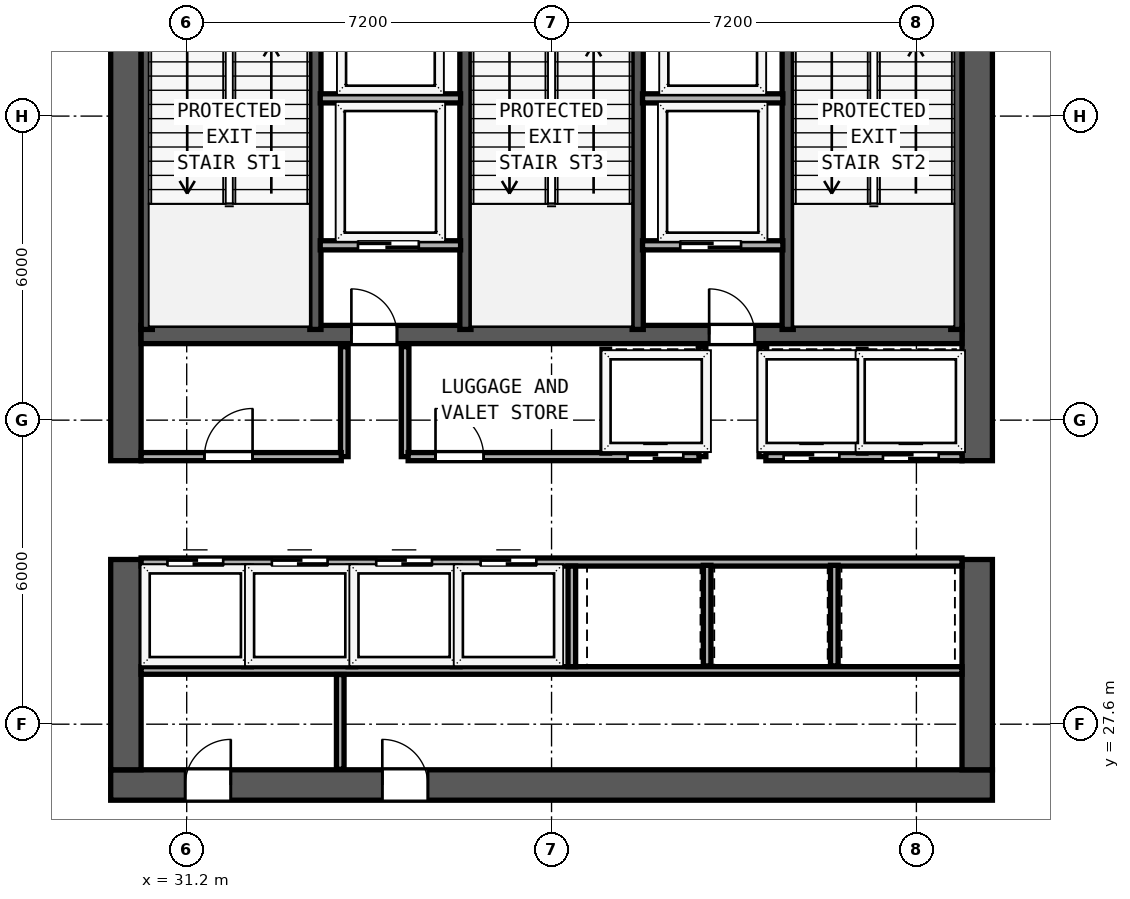
"""IFC4 building model, lengths in metres.
Left out: names, types, materials, properties, quantities, classifications, styles, units other than length and angle.
Written with IfcOpenShell. Run it as: python <this file> out.ifc"""

import sys

from ifc_helpers import new_model, si_unit, direction, frame, frame_2d, origin, place, context, subcontext, project, spatial, rectangle, extrude, element, fill, save


model = new_model("IFC4")
c1 = context("Model", 3, precision=1e-05, world=origin(), true_north=direction((0.0, 1.0)))
c2 = subcontext(c1, "Body", "Model", "MODEL_VIEW")
j1 = project(units=[si_unit("LENGTHUNIT", "METRE"), si_unit("PLANEANGLEUNIT", "RADIAN")], contexts=[c1])
p1 = place(None, origin())
s1 = spatial("IfcSite", under=j1, at=p1, CompositionType="ELEMENT")
p2 = place(p1, origin())
s2 = spatial("IfcBuilding", under=s1, at=p2, CompositionType="ELEMENT")
p3 = place(p2, frame((0.0, 0.0, 164.6)))
s3 = spatial("IfcBuildingStorey", under=s2, at=p3, CompositionType="ELEMENT", Elevation=164.6)
p4 = place(p3, frame((29.7, 26.4, 0.0), z_axis=(0.0, 0.0, 1.0), x_axis=(1.0, 0.0, 0.0)))
e1 = element("IfcWall", 1, at=p4, inside=s3, PredefinedType="SHEAR", context=c2, shape_type="SweptSolid", body=[
    extrude(rectangle(XDim=17.4, YDim=0.6, at=frame_2d((8.7, 0.0))), origin(), (0.0, 0.0, 1.0), 4.22),
])
p5 = place(p4, frame((2.37, 0.0, 0.0), z_axis=(0.0, 0.0, 1.0), x_axis=(-1.0, 0.0, 0.0)))
e2 = element("IfcOpeningElement", 2, at=p5, cuts=e1, PredefinedType="OPENING", context=c2, shape_type="SweptSolid", body=[
    extrude(rectangle(XDim=0.9, YDim=2.1, at=frame_2d((0.45, 1.05))), frame((0.0, 0.31, 0.0), z_axis=(0.0, -1.0, 0.0), x_axis=(1.0, 0.0, 0.0)), (0.0, 0.0, 1.0), 0.62),
])
p6 = place(p4, frame((6.26, 0.0, 0.0), z_axis=(0.0, 0.0, 1.0), x_axis=(-1.0, 0.0, 0.0)))
e3 = element("IfcOpeningElement", 3, at=p6, cuts=e1, PredefinedType="OPENING", context=c2, shape_type="SweptSolid", body=[
    extrude(rectangle(XDim=0.9, YDim=2.1, at=frame_2d((0.45, 1.05))), frame((0.0, 0.31, 0.0), z_axis=(0.0, -1.0, 0.0), x_axis=(1.0, 0.0, 0.0)), (0.0, 0.0, 1.0), 0.62),
])
p7 = place(p3, frame((30.0, 26.7, 0.0), z_axis=(0.0, 0.0, 1.0), x_axis=(0.0, 1.0, 0.0)))
e4 = element("IfcWall", 4, at=p7, inside=s3, PredefinedType="SHEAR", context=c2, shape_type="SweptSolid", body=[
    extrude(rectangle(XDim=4.15, YDim=0.6, at=frame_2d((2.075, 0.0))), origin(), (0.0, 0.0, 1.0), 4.22),
])
p8 = place(p3, frame((30.0, 32.8, 0.0), z_axis=(0.0, 0.0, 1.0), x_axis=(0.0, 1.0, 0.0)))
e5 = element("IfcWall", 5, at=p8, inside=s3, PredefinedType="SHEAR", context=c2, shape_type="SweptSolid", body=[
    extrude(rectangle(XDim=10.1, YDim=0.6, at=frame_2d((5.05, 0.0))), origin(), (0.0, 0.0, 1.0), 4.22),
])
p9 = place(p3, frame((46.8, 26.7, 0.0), z_axis=(0.0, 0.0, 1.0), x_axis=(0.0, 1.0, 0.0)))
e6 = element("IfcWall", 6, at=p9, inside=s3, PredefinedType="SHEAR", context=c2, shape_type="SweptSolid", body=[
    extrude(rectangle(XDim=4.15, YDim=0.6, at=frame_2d((2.075, 0.0))), origin(), (0.0, 0.0, 1.0), 4.22),
])
p10 = place(p3, frame((46.8, 32.8, 0.0), z_axis=(0.0, 0.0, 1.0), x_axis=(0.0, 1.0, 0.0)))
e7 = element("IfcWall", 7, at=p10, inside=s3, PredefinedType="SHEAR", context=c2, shape_type="SweptSolid", body=[
    extrude(rectangle(XDim=10.1, YDim=0.6, at=frame_2d((5.05, 0.0))), origin(), (0.0, 0.0, 1.0), 4.22),
])
p11 = place(p3, frame((30.3, 35.29, 0.0), z_axis=(0.0, 0.0, 1.0), x_axis=(1.0, 0.0, 0.0)))
e8 = element("IfcWall", 8, at=p11, inside=s3, PredefinedType="SHEAR", context=c2, shape_type="SweptSolid", body=[
    extrude(rectangle(XDim=16.2, YDim=0.36, at=frame_2d((8.1, 0.0))), origin(), (0.0, 0.0, 1.0), 4.22),
])
p12 = place(p11, frame((5.05, 0.0, 0.0), z_axis=(0.0, 0.0, 1.0), x_axis=(-1.0, 0.0, 0.0)))
e9 = element("IfcOpeningElement", 9, at=p12, cuts=e8, PredefinedType="OPENING", context=c2, shape_type="SweptSolid", body=[
    extrude(rectangle(XDim=0.9, YDim=2.1, at=frame_2d((0.45, 1.05))), frame((0.0, 0.19, 0.0), z_axis=(0.0, -1.0, 0.0), x_axis=(1.0, 0.0, 0.0)), (0.0, 0.0, 1.0), 0.38),
])
p13 = place(p11, frame((12.11, 0.0, 0.0), z_axis=(0.0, 0.0, 1.0), x_axis=(-1.0, 0.0, 0.0)))
e10 = element("IfcOpeningElement", 10, at=p13, cuts=e8, PredefinedType="OPENING", context=c2, shape_type="SweptSolid", body=[
    extrude(rectangle(XDim=0.9, YDim=2.1, at=frame_2d((0.45, 1.05))), frame((0.0, 0.19, 0.0), z_axis=(0.0, -1.0, 0.0), x_axis=(1.0, 0.0, 0.0)), (0.0, 0.0, 1.0), 0.38),
])
for number, where, z_axis, x_axis in (
    (11, (30.412, 35.39, 0.0), (0.0, 0.0, 1.0), (0.0, 1.0, 0.0)),
    (12, (33.74, 35.39, 0.0), (0.0, 0.0, 1.0), (0.0, 1.0, 0.0)),
    (13, (36.7, 35.39, 0.0), (0.0, 0.0, 1.0), (0.0, 1.0, 0.0)),
    (14, (40.1, 35.39, 0.0), (0.0, 0.0, 1.0), (0.0, 1.0, 0.0)),
    (15, (43.06, 35.39, 0.0), (0.0, 0.0, 1.0), (0.0, 1.0, 0.0)),
    (16, (46.388, 35.39, 0.0), (0.0, 0.0, 1.0), (0.0, 1.0, 0.0)),
):
    element("IfcWall", number, at=place(p3, frame(where, z_axis=z_axis, x_axis=x_axis)), inside=s3, PredefinedType="SHEAR", context=c2, shape_type="SweptSolid", body=[
        extrude(rectangle(XDim=7.51, YDim=0.22, at=frame_2d((3.755, 0.0))), origin(), (0.0, 0.0, 1.0), 4.22),
    ])
for number, where, z_axis, x_axis in (
    (17, (33.835, 39.95, 0.0), (0.0, 0.0, 1.0), (1.0, 0.0, 0.0)),
    (18, (40.195, 39.95, 0.0), (0.0, 0.0, 1.0), (1.0, 0.0, 0.0)),
):
    element("IfcWall", number, at=place(p3, frame(where, z_axis=z_axis, x_axis=x_axis)), inside=s3, PredefinedType="SOLIDWALL", context=c2, shape_type="SweptSolid", body=[
        extrude(rectangle(XDim=2.77, YDim=0.18, at=frame_2d((1.385, 0.0))), origin(), (0.0, 0.0, 1.0), 4.22),
    ])
p14 = place(p3, frame((33.835, 37.05, 0.0), z_axis=(0.0, 0.0, 1.0), x_axis=(1.0, 0.0, 0.0)))
e19 = element("IfcWall", 19, at=p14, inside=s3, PredefinedType="SOLIDWALL", context=c2, shape_type="SweptSolid", body=[
    extrude(rectangle(XDim=2.77, YDim=0.18, at=frame_2d((1.385, 0.0))), origin(), (0.0, 0.0, 1.0), 4.22),
])
p15 = place(p14, frame((1.945, 0.0, 0.0), z_axis=(0.0, 0.0, 1.0), x_axis=(-1.0, 0.0, 0.0)))
e20 = element("IfcOpeningElement", 20, at=p15, cuts=e19, PredefinedType="OPENING", context=c2, shape_type="SweptSolid", body=[
    extrude(rectangle(XDim=1.2, YDim=2.2, at=frame_2d((0.6, 1.1))), frame((0.0, 0.1, 0.0), z_axis=(0.0, -1.0, 0.0), x_axis=(1.0, 0.0, 0.0)), (0.0, 0.0, 1.0), 0.2),
])
for number, where, z_axis, x_axis in (
    (21, (34.31, 32.88, 0.0), (0.0, 0.0, 1.0), (0.0, 1.0, 0.0)),
    (22, (35.51, 32.88, 0.0), (0.0, 0.0, 1.0), (0.0, 1.0, 0.0)),
):
    element("IfcWall", number, at=place(p3, frame(where, z_axis=z_axis, x_axis=x_axis)), inside=s3, PredefinedType="SOLIDWALL", context=c2, shape_type="SweptSolid", body=[
        extrude(rectangle(XDim=2.17, YDim=0.15, at=frame_2d((1.085, 0.0))), origin(), (0.0, 0.0, 1.0), 4.22),
    ])
p16 = place(p3, frame((40.195, 37.05, 0.0), z_axis=(0.0, 0.0, 1.0), x_axis=(1.0, 0.0, 0.0)))
e23 = element("IfcWall", 23, at=p16, inside=s3, PredefinedType="SOLIDWALL", context=c2, shape_type="SweptSolid", body=[
    extrude(rectangle(XDim=2.77, YDim=0.18, at=frame_2d((1.385, 0.0))), origin(), (0.0, 0.0, 1.0), 4.22),
])
p17 = place(p16, frame((1.945, 0.0, 0.0), z_axis=(0.0, 0.0, 1.0), x_axis=(-1.0, 0.0, 0.0)))
e24 = element("IfcOpeningElement", 24, at=p17, cuts=e23, PredefinedType="OPENING", context=c2, shape_type="SweptSolid", body=[
    extrude(rectangle(XDim=1.2, YDim=2.2, at=frame_2d((0.6, 1.1))), frame((0.0, 0.1, 0.0), z_axis=(0.0, -1.0, 0.0), x_axis=(1.0, 0.0, 0.0)), (0.0, 0.0, 1.0), 0.2),
])
for number, where, z_axis, x_axis in (
    (25, (41.37, 32.88, 0.0), (0.0, 0.0, 1.0), (0.0, 1.0, 0.0)),
    (26, (42.57, 32.88, 0.0), (0.0, 0.0, 1.0), (0.0, 1.0, 0.0)),
):
    element("IfcWall", number, at=place(p3, frame(where, z_axis=z_axis, x_axis=x_axis)), inside=s3, PredefinedType="SOLIDWALL", context=c2, shape_type="SweptSolid", body=[
        extrude(rectangle(XDim=2.17, YDim=0.15, at=frame_2d((1.085, 0.0))), origin(), (0.0, 0.0, 1.0), 4.22),
    ])
p18 = place(p3, frame((30.3, 32.88, 0.0), z_axis=(0.0, 0.0, 1.0), x_axis=(1.0, 0.0, 0.0)))
e27 = element("IfcWall", 27, at=p18, inside=s3, PredefinedType="SOLIDWALL", context=c2, shape_type="SweptSolid", body=[
    extrude(rectangle(XDim=3.95, YDim=0.16, at=frame_2d((1.975, 0.0))), origin(), (0.0, 0.0, 1.0), 4.22),
])
p19 = place(p18, frame((2.2, 0.0, 0.0), z_axis=(0.0, 0.0, 1.0), x_axis=(-1.0, 0.0, 0.0)))
e28 = element("IfcOpeningElement", 28, at=p19, cuts=e27, PredefinedType="OPENING", context=c2, shape_type="SweptSolid", body=[
    extrude(rectangle(XDim=0.95, YDim=2.12, at=frame_2d((0.475, 1.06))), frame((0.0, 0.09, 0.0), z_axis=(0.0, -1.0, 0.0), x_axis=(1.0, 0.0, 0.0)), (0.0, 0.0, 1.0), 0.18),
])
p20 = place(p3, frame((35.57, 32.88, 0.0), z_axis=(0.0, 0.0, 1.0), x_axis=(1.0, 0.0, 0.0)))
e29 = element("IfcWall", 29, at=p20, inside=s3, PredefinedType="SOLIDWALL", context=c2, shape_type="SweptSolid", body=[
    extrude(rectangle(XDim=5.74, YDim=0.16, at=frame_2d((2.87, 0.0))), origin(), (0.0, 0.0, 1.0), 4.22),
])
p21 = place(p20, frame((1.49, 0.0, 0.0), z_axis=(0.0, 0.0, 1.0), x_axis=(-1.0, 0.0, 0.0)))
e30 = element("IfcOpeningElement", 30, at=p21, cuts=e29, PredefinedType="OPENING", context=c2, shape_type="SweptSolid", body=[
    extrude(rectangle(XDim=0.95, YDim=2.12, at=frame_2d((0.475, 1.06))), frame((0.0, 0.09, 0.0), z_axis=(0.0, -1.0, 0.0), x_axis=(1.0, 0.0, 0.0)), (0.0, 0.0, 1.0), 0.18),
])
p22 = place(p20, frame((5.43, 0.0, 0.0), z_axis=(0.0, 0.0, 1.0), x_axis=(-1.0, 0.0, 0.0)))
e31 = element("IfcOpeningElement", 31, at=p22, cuts=e29, PredefinedType="OPENING", context=c2, shape_type="SweptSolid", body=[
    extrude(rectangle(XDim=1.1, YDim=2.2, at=frame_2d((0.55, 1.1))), frame((0.0, 0.09, 0.0), z_axis=(0.0, -1.0, 0.0), x_axis=(1.0, 0.0, 0.0)), (0.0, 0.0, 1.0), 0.18),
])
p23 = place(p3, frame((42.63, 32.88, 0.0), z_axis=(0.0, 0.0, 1.0), x_axis=(1.0, 0.0, 0.0)))
e32 = element("IfcWall", 32, at=p23, inside=s3, PredefinedType="SOLIDWALL", context=c2, shape_type="SweptSolid", body=[
    extrude(rectangle(XDim=3.87, YDim=0.16, at=frame_2d((1.935, 0.0))), origin(), (0.0, 0.0, 1.0), 4.22),
])
p24 = place(p23, frame((1.45, 0.0, 0.0), z_axis=(0.0, 0.0, 1.0), x_axis=(-1.0, 0.0, 0.0)))
e33 = element("IfcOpeningElement", 33, at=p24, cuts=e32, PredefinedType="OPENING", context=c2, shape_type="SweptSolid", body=[
    extrude(rectangle(XDim=1.1, YDim=2.2, at=frame_2d((0.55, 1.1))), frame((0.0, 0.09, 0.0), z_axis=(0.0, -1.0, 0.0), x_axis=(1.0, 0.0, 0.0)), (0.0, 0.0, 1.0), 0.18),
])
p25 = place(p23, frame((3.41, 0.0, 0.0), z_axis=(0.0, 0.0, 1.0), x_axis=(-1.0, 0.0, 0.0)))
e34 = element("IfcOpeningElement", 34, at=p25, cuts=e32, PredefinedType="OPENING", context=c2, shape_type="SweptSolid", body=[
    extrude(rectangle(XDim=1.1, YDim=2.2, at=frame_2d((0.55, 1.1))), frame((0.0, 0.09, 0.0), z_axis=(0.0, -1.0, 0.0), x_axis=(1.0, 0.0, 0.0)), (0.0, 0.0, 1.0), 0.18),
])
for number, where, z_axis, x_axis in (
    (35, (39.47, 32.95, 0.0), (0.0, 0.0, 1.0), (0.0, 1.0, 0.0)),
    (36, (44.53, 32.95, 0.0), (0.0, 0.0, 1.0), (0.0, 1.0, 0.0)),
):
    element("IfcWall", number, at=place(p3, frame(where, z_axis=z_axis, x_axis=x_axis)), inside=s3, PredefinedType="SOLIDWALL", context=c2, shape_type="SweptSolid", body=[
        extrude(rectangle(XDim=2.05, YDim=0.15, at=frame_2d((1.025, 0.0))), origin(), (0.0, 0.0, 1.0), 4.22),
    ])
p26 = place(p3, frame((30.3, 30.8, 0.0), z_axis=(0.0, 0.0, 1.0), x_axis=(1.0, 0.0, 0.0)))
e37 = element("IfcWall", 37, at=p26, inside=s3, PredefinedType="SOLIDWALL", context=c2, shape_type="SweptSolid", body=[
    extrude(rectangle(XDim=16.2, YDim=0.16, at=frame_2d((8.1, 0.0))), origin(), (0.0, 0.0, 1.0), 4.22),
])
p27 = place(p26, frame((0.52, 0.0, 0.0)))
e38 = element("IfcOpeningElement", 38, at=p27, cuts=e37, PredefinedType="OPENING", context=c2, shape_type="SweptSolid", body=[
    extrude(rectangle(XDim=1.1, YDim=2.2, at=frame_2d((0.55, 1.1))), frame((0.0, 0.09, 0.0), z_axis=(0.0, -1.0, 0.0), x_axis=(1.0, 0.0, 0.0)), (0.0, 0.0, 1.0), 0.18),
])
p28 = place(p26, frame((2.58, 0.0, 0.0)))
e39 = element("IfcOpeningElement", 39, at=p28, cuts=e37, PredefinedType="OPENING", context=c2, shape_type="SweptSolid", body=[
    extrude(rectangle(XDim=1.1, YDim=2.2, at=frame_2d((0.55, 1.1))), frame((0.0, 0.09, 0.0), z_axis=(0.0, -1.0, 0.0), x_axis=(1.0, 0.0, 0.0)), (0.0, 0.0, 1.0), 0.18),
])
p29 = place(p26, frame((4.64, 0.0, 0.0)))
e40 = element("IfcOpeningElement", 40, at=p29, cuts=e37, PredefinedType="OPENING", context=c2, shape_type="SweptSolid", body=[
    extrude(rectangle(XDim=1.1, YDim=2.2, at=frame_2d((0.55, 1.1))), frame((0.0, 0.09, 0.0), z_axis=(0.0, -1.0, 0.0), x_axis=(1.0, 0.0, 0.0)), (0.0, 0.0, 1.0), 0.18),
])
p30 = place(p26, frame((6.7, 0.0, 0.0)))
e41 = element("IfcOpeningElement", 41, at=p30, cuts=e37, PredefinedType="OPENING", context=c2, shape_type="SweptSolid", body=[
    extrude(rectangle(XDim=1.1, YDim=2.2, at=frame_2d((0.55, 1.1))), frame((0.0, 0.09, 0.0), z_axis=(0.0, -1.0, 0.0), x_axis=(1.0, 0.0, 0.0)), (0.0, 0.0, 1.0), 0.18),
])
p31 = place(p3, frame((30.3, 28.66, 0.0), z_axis=(0.0, 0.0, 1.0), x_axis=(1.0, 0.0, 0.0)))
e42 = element("IfcWall", 42, at=p31, inside=s3, PredefinedType="PARTITIONING", context=c2, shape_type="SweptSolid", body=[
    extrude(rectangle(XDim=16.2, YDim=0.15, at=frame_2d((8.1, 0.0))), origin(), (0.0, 0.0, 1.0), 4.22),
])
for number, where, z_axis, x_axis in (
    (43, (32.4, 28.735, 0.0), (0.0, 0.0, 1.0), (0.0, 1.0, 0.0)),
    (44, (34.46, 28.735, 0.0), (0.0, 0.0, 1.0), (0.0, 1.0, 0.0)),
    (45, (36.52, 28.735, 0.0), (0.0, 0.0, 1.0), (0.0, 1.0, 0.0)),
    (46, (38.8, 28.735, 0.0), (0.0, 0.0, 1.0), (0.0, 1.0, 0.0)),
):
    element("IfcWall", number, at=place(p3, frame(where, z_axis=z_axis, x_axis=x_axis)), inside=s3, PredefinedType="SOLIDWALL", context=c2, shape_type="SweptSolid", body=[
        extrude(rectangle(XDim=1.985, YDim=0.15, at=frame_2d((0.992, 0.0))), origin(), (0.0, 0.0, 1.0), 4.22),
    ])
p32 = place(p3, frame((34.23, 26.71, 0.0), z_axis=(0.0, 0.0, 1.0), x_axis=(0.0, 1.0, 0.0)))
e47 = element("IfcWall", 47, at=p32, inside=s3, PredefinedType="PARTITIONING", context=c2, shape_type="SweptSolid", body=[
    extrude(rectangle(XDim=1.87, YDim=0.15, at=frame_2d((0.935, 0.0))), origin(), (0.0, 0.0, 1.0), 4.22),
])
for number, where, z_axis, x_axis in (
    (48, (41.47, 28.75, 0.0), (0.0, 0.0, 1.0), (0.0, 1.0, 0.0)),
    (49, (43.98, 28.75, 0.0), (0.0, 0.0, 1.0), (0.0, 1.0, 0.0)),
):
    element("IfcWall", number, at=place(p3, frame(where, z_axis=z_axis, x_axis=x_axis)), inside=s3, PredefinedType="SOLIDWALL", context=c2, shape_type="SweptSolid", body=[
        extrude(rectangle(XDim=1.985, YDim=0.15, at=frame_2d((0.993, 0.0))), origin(), (0.0, 0.0, 1.0), 4.22),
    ])
p33 = place(p15, origin())
e50 = element("IfcDoor", 50, at=p33, inside=s3, OperationType="SLIDING_TO_RIGHT", PredefinedType="DOOR", context=c2, shape_type="SweptSolid", body=[
    extrude(rectangle(XDim=1.2, YDim=2.2, at=frame_2d((0.6, 1.1))), frame((0.0, 0.025, 0.0), z_axis=(0.0, -1.0, 0.0), x_axis=(1.0, 0.0, 0.0)), (0.0, 0.0, 1.0), 0.05),
])
fill(e20, e50)
p34 = place(p12, origin())
e51 = element("IfcDoor", 51, at=p34, inside=s3, OperationType="SINGLE_SWING_RIGHT", PredefinedType="DOOR", context=c2, shape_type="SweptSolid", body=[
    extrude(rectangle(XDim=0.9, YDim=2.1, at=frame_2d((0.45, 1.05))), frame((0.0, 0.025, 0.0), z_axis=(0.0, -1.0, 0.0), x_axis=(1.0, 0.0, 0.0)), (0.0, 0.0, 1.0), 0.05),
])
fill(e9, e51)
p35 = place(p17, origin())
e52 = element("IfcDoor", 52, at=p35, inside=s3, OperationType="SLIDING_TO_RIGHT", PredefinedType="DOOR", context=c2, shape_type="SweptSolid", body=[
    extrude(rectangle(XDim=1.2, YDim=2.2, at=frame_2d((0.6, 1.1))), frame((0.0, 0.025, 0.0), z_axis=(0.0, -1.0, 0.0), x_axis=(1.0, 0.0, 0.0)), (0.0, 0.0, 1.0), 0.05),
])
fill(e24, e52)
p36 = place(p13, origin())
e53 = element("IfcDoor", 53, at=p36, inside=s3, OperationType="SINGLE_SWING_RIGHT", PredefinedType="DOOR", context=c2, shape_type="SweptSolid", body=[
    extrude(rectangle(XDim=0.9, YDim=2.1, at=frame_2d((0.45, 1.05))), frame((0.0, 0.025, 0.0), z_axis=(0.0, -1.0, 0.0), x_axis=(1.0, 0.0, 0.0)), (0.0, 0.0, 1.0), 0.05),
])
fill(e10, e53)
p37 = place(p19, origin())
e54 = element("IfcDoor", 54, at=p37, inside=s3, OperationType="SINGLE_SWING_LEFT", PredefinedType="DOOR", context=c2, shape_type="SweptSolid", body=[
    extrude(rectangle(XDim=0.95, YDim=2.12, at=frame_2d((0.475, 1.06))), frame((0.0, 0.025, 0.0), z_axis=(0.0, -1.0, 0.0), x_axis=(1.0, 0.0, 0.0)), (0.0, 0.0, 1.0), 0.05),
])
fill(e28, e54)
p38 = place(p21, origin())
e55 = element("IfcDoor", 55, at=p38, inside=s3, OperationType="SINGLE_SWING_RIGHT", PredefinedType="DOOR", context=c2, shape_type="SweptSolid", body=[
    extrude(rectangle(XDim=0.95, YDim=2.12, at=frame_2d((0.475, 1.06))), frame((0.0, 0.025, 0.0), z_axis=(0.0, -1.0, 0.0), x_axis=(1.0, 0.0, 0.0)), (0.0, 0.0, 1.0), 0.05),
])
fill(e30, e55)
p39 = place(p22, origin())
e56 = element("IfcDoor", 56, at=p39, inside=s3, OperationType="SLIDING_TO_RIGHT", PredefinedType="DOOR", context=c2, shape_type="SweptSolid", body=[
    extrude(rectangle(XDim=1.1, YDim=2.2, at=frame_2d((0.55, 1.1))), frame((0.0, 0.025, 0.0), z_axis=(0.0, -1.0, 0.0), x_axis=(1.0, 0.0, 0.0)), (0.0, 0.0, 1.0), 0.05),
])
fill(e31, e56)
p40 = place(p24, origin())
e57 = element("IfcDoor", 57, at=p40, inside=s3, OperationType="SLIDING_TO_RIGHT", PredefinedType="DOOR", context=c2, shape_type="SweptSolid", body=[
    extrude(rectangle(XDim=1.1, YDim=2.2, at=frame_2d((0.55, 1.1))), frame((0.0, 0.025, 0.0), z_axis=(0.0, -1.0, 0.0), x_axis=(1.0, 0.0, 0.0)), (0.0, 0.0, 1.0), 0.05),
])
fill(e33, e57)
p41 = place(p25, origin())
e58 = element("IfcDoor", 58, at=p41, inside=s3, OperationType="SLIDING_TO_RIGHT", PredefinedType="DOOR", context=c2, shape_type="SweptSolid", body=[
    extrude(rectangle(XDim=1.1, YDim=2.2, at=frame_2d((0.55, 1.1))), frame((0.0, 0.025, 0.0), z_axis=(0.0, -1.0, 0.0), x_axis=(1.0, 0.0, 0.0)), (0.0, 0.0, 1.0), 0.05),
])
fill(e34, e58)
p42 = place(p27, origin())
e59 = element("IfcDoor", 59, at=p42, inside=s3, OperationType="SLIDING_TO_LEFT", PredefinedType="DOOR", context=c2, shape_type="SweptSolid", body=[
    extrude(rectangle(XDim=1.1, YDim=2.2, at=frame_2d((0.55, 1.1))), frame((0.0, 0.025, 0.0), z_axis=(0.0, -1.0, 0.0), x_axis=(1.0, 0.0, 0.0)), (0.0, 0.0, 1.0), 0.05),
])
fill(e38, e59)
p43 = place(p28, origin())
e60 = element("IfcDoor", 60, at=p43, inside=s3, OperationType="SLIDING_TO_LEFT", PredefinedType="DOOR", context=c2, shape_type="SweptSolid", body=[
    extrude(rectangle(XDim=1.1, YDim=2.2, at=frame_2d((0.55, 1.1))), frame((0.0, 0.025, 0.0), z_axis=(0.0, -1.0, 0.0), x_axis=(1.0, 0.0, 0.0)), (0.0, 0.0, 1.0), 0.05),
])
fill(e39, e60)
p44 = place(p29, origin())
e61 = element("IfcDoor", 61, at=p44, inside=s3, OperationType="SLIDING_TO_LEFT", PredefinedType="DOOR", context=c2, shape_type="SweptSolid", body=[
    extrude(rectangle(XDim=1.1, YDim=2.2, at=frame_2d((0.55, 1.1))), frame((0.0, 0.025, 0.0), z_axis=(0.0, -1.0, 0.0), x_axis=(1.0, 0.0, 0.0)), (0.0, 0.0, 1.0), 0.05),
])
fill(e40, e61)
p45 = place(p30, origin())
e62 = element("IfcDoor", 62, at=p45, inside=s3, OperationType="SLIDING_TO_LEFT", PredefinedType="DOOR", context=c2, shape_type="SweptSolid", body=[
    extrude(rectangle(XDim=1.1, YDim=2.2, at=frame_2d((0.55, 1.1))), frame((0.0, 0.025, 0.0), z_axis=(0.0, -1.0, 0.0), x_axis=(1.0, 0.0, 0.0)), (0.0, 0.0, 1.0), 0.05),
])
fill(e41, e62)
p46 = place(p5, origin())
e63 = element("IfcDoor", 63, at=p46, inside=s3, OperationType="SINGLE_SWING_LEFT", PredefinedType="DOOR", context=c2, shape_type="SweptSolid", body=[
    extrude(rectangle(XDim=0.9, YDim=2.1, at=frame_2d((0.45, 1.05))), frame((0.0, -0.195, 0.0), z_axis=(0.0, -1.0, 0.0), x_axis=(1.0, 0.0, 0.0)), (0.0, 0.0, 1.0), 0.05),
])
fill(e2, e63)
p47 = place(p6, origin())
e64 = element("IfcDoor", 64, at=p47, inside=s3, OperationType="SINGLE_SWING_RIGHT", PredefinedType="DOOR", context=c2, shape_type="SweptSolid", body=[
    extrude(rectangle(XDim=0.9, YDim=2.1, at=frame_2d((0.45, 1.05))), frame((0.0, -0.195, 0.0), z_axis=(0.0, -1.0, 0.0), x_axis=(1.0, 0.0, 0.0)), (0.0, 0.0, 1.0), 0.05),
])
fill(e3, e64)
save(model, sys.argv[1])
